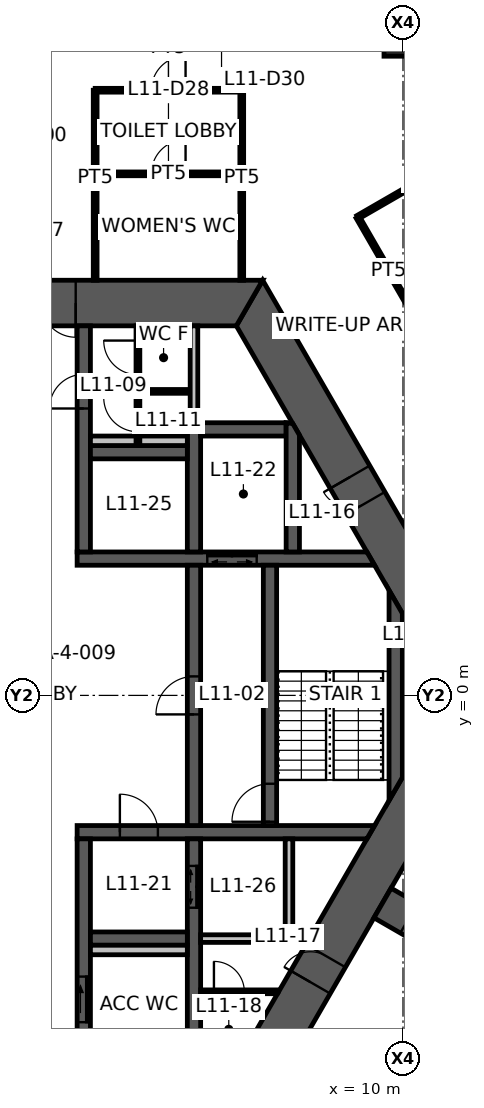
"""IFC4 building model, lengths in metres.
Left out: names, types, materials, properties, quantities, classifications, styles, units other than length and angle.
Written with IfcOpenShell. Run it as: python <this file> out.ifc"""

import sys

from ifc_helpers import new_model, si_unit, direction, frame, frame_2d, origin, origin_2d, place, context, subcontext, project, spatial, polyline, rectangle, hollow_rectangle, outline, extrude, element, fill, save


model = new_model("IFC4")
c1 = context("Model", 3, precision=1e-05, world=origin(), true_north=direction((0.0, 1.0)))
c2 = subcontext(c1, "Body", "Model", "MODEL_VIEW")
j1 = project(units=[si_unit("LENGTHUNIT", "METRE"), si_unit("PLANEANGLEUNIT", "RADIAN")], contexts=[c1])
p1 = place(None, origin())
s1 = spatial("IfcSite", under=j1, at=p1, CompositionType="ELEMENT")
p2 = place(p1, origin())
s2 = spatial("IfcBuilding", under=s1, at=p2, CompositionType="ELEMENT")
p3 = place(p2, frame((0.0, 0.0, 43.6)))
s3 = spatial("IfcBuildingStorey", under=s2, at=p3, CompositionType="ELEMENT", Elevation=43.6)
p4 = place(p3, frame((10.0, 17.321, 0.0), z_axis=(0.0, 0.0, 1.0), x_axis=(1.0, 0.0, 0.0)))
e1 = element("IfcColumn", 1, at=p4, inside=s3, PredefinedType="COLUMN", context=c2, shape_type="SweptSolid", body=[
    extrude(hollow_rectangle(XDim=1.0, YDim=1.0, WallThickness=0.06, at=origin_2d()), origin(), (0.0, 0.0, 1.0), 4.2),
])
p5 = place(p3, frame((11.922, 0.0, 0.0), z_axis=(0.0, 0.0, 1.0), x_axis=(-0.500004296715, 0.866022923061, 0.0)))
e2 = element("IfcWall", 2, at=p5, inside=s3, PredefinedType="SHEAR", context=c2, shape_type="SweptSolid", body=[
    extrude(outline(polyline([(-0.346, -0.6), (5.835, -0.6), (6.635, -0.6), (12.269, -0.6), (11.576, 0.6), (6.635, 0.6), (5.835, 0.6), (0.346, 0.6), (-0.346, -0.6)])), origin(), (0.0, 0.0, 1.0), 4.2),
])
p6 = place(p5, frame((5.835, 0.0, 0.0)))
e3 = element("IfcOpeningElement", 3, at=p6, cuts=e2, PredefinedType="OPENING", context=c2, shape_type="SweptSolid", body=[
    extrude(rectangle(XDim=0.8, YDim=2.1, at=frame_2d((0.4, 1.05))), frame((0.0, 0.61, 0.0), z_axis=(0.0, -1.0, 0.0), x_axis=(1.0, 0.0, 0.0)), (0.0, 0.0, 1.0), 1.22),
])
p7 = place(p3, frame((5.961, 10.325, 0.0), z_axis=(0.0, 0.0, 1.0), x_axis=(-1.0, 0.0, 0.0)))
e4 = element("IfcWall", 4, at=p7, inside=s3, PredefinedType="SHEAR", context=c2, shape_type="SweptSolid", body=[
    extrude(outline(polyline([(-0.346, -0.6), (4.574, -0.6), (5.474, -0.6), (6.449, -0.6), (7.349, -0.6), (12.269, -0.6), (11.576, 0.6), (7.349, 0.6), (6.449, 0.6), (5.474, 0.6), (4.574, 0.6), (0.346, 0.6), (-0.346, -0.6)])), origin(), (0.0, 0.0, 1.0), 4.2),
])
p8 = place(p7, frame((6.449, 0.0, 0.0)))
e5 = element("IfcOpeningElement", 5, at=p8, cuts=e4, PredefinedType="OPENING", context=c2, shape_type="SweptSolid", body=[
    extrude(rectangle(XDim=0.9, YDim=2.1, at=frame_2d((0.45, 1.05))), frame((0.0, 0.61, 0.0), z_axis=(0.0, -1.0, 0.0), x_axis=(1.0, 0.0, 0.0)), (0.0, 0.0, 1.0), 1.22),
])
p9 = place(p7, frame((4.574, 0.0, 0.0)))
e6 = element("IfcOpeningElement", 6, at=p9, cuts=e4, PredefinedType="OPENING", context=c2, shape_type="SweptSolid", body=[
    extrude(rectangle(XDim=0.9, YDim=2.1, at=frame_2d((0.45, 1.05))), frame((0.0, 0.61, 0.0), z_axis=(0.0, -1.0, 0.0), x_axis=(1.0, 0.0, 0.0)), (0.0, 0.0, 1.0), 1.22),
])
p10 = place(p3, frame((5.961, -10.325, 0.0), z_axis=(0.0, 0.0, 1.0), x_axis=(0.500004296715, 0.866022923061, 0.0)))
e7 = element("IfcWall", 7, at=p10, inside=s3, PredefinedType="SHEAR", context=c2, shape_type="SweptSolid", body=[
    extrude(outline(polyline([(-0.346, -0.6), (3.208, -0.6), (4.009, -0.6), (12.269, -0.6), (11.576, 0.6), (4.009, 0.6), (3.208, 0.6), (0.346, 0.6), (-0.346, -0.6)])), origin(), (0.0, 0.0, 1.0), 4.2),
])
p11 = place(p10, frame((3.208, 0.0, 0.0)))
e8 = element("IfcOpeningElement", 8, at=p11, cuts=e7, PredefinedType="OPENING", context=c2, shape_type="SweptSolid", body=[
    extrude(rectangle(XDim=0.8, YDim=2.1, at=frame_2d((0.4, 1.05))), frame((0.0, 0.61, 0.0), z_axis=(0.0, -1.0, 0.0), x_axis=(1.0, 0.0, 0.0)), (0.0, 0.0, 1.0), 1.22),
])
p12 = place(p3, frame((9.461, -5.462, 0.0), z_axis=(0.0, 0.0, 1.0), x_axis=(0.866019116917, -0.500010889016, 0.0)))
e9 = element("IfcWall", 9, at=p12, inside=s3, PredefinedType="SHEAR", context=c2, shape_type="SweptSolid", body=[
    extrude(rectangle(XDim=7.595, YDim=0.9, at=frame_2d((3.798, 0.0))), origin(), (0.0, 0.0, 1.0), 4.2),
])
p13 = place(p12, frame((0.8, 0.0, 0.0)))
e10 = element("IfcOpeningElement", 10, at=p13, cuts=e9, PredefinedType="OPENING", context=c2, shape_type="SweptSolid", body=[
    extrude(rectangle(XDim=1.0, YDim=2.1, at=frame_2d((0.5, 1.05))), frame((0.0, 0.46, 0.0), z_axis=(0.0, -1.0, 0.0), x_axis=(1.0, 0.0, 0.0)), (0.0, 0.0, 1.0), 0.92),
])
p14 = place(p3, frame((1.425, 3.6, 0.0), z_axis=(0.0, 0.0, 1.0), x_axis=(1.0, 0.0, 0.0)))
e11 = element("IfcWall", 11, at=p14, inside=s3, PredefinedType="SHEAR", context=c2, shape_type="SweptSolid", body=[
    extrude(outline(polyline([(0.0, -0.175), (3.425, -0.175), (4.725, -0.175), (7.827, -0.175), (7.625, 0.175), (4.725, 0.175), (3.425, 0.175), (0.0, 0.175), (0.0, -0.175)])), origin(), (0.0, 0.0, 1.0), 4.2),
])
p15 = place(p14, frame((3.425, 0.0, 0.0)))
e12 = element("IfcOpeningElement", 12, at=p15, cuts=e11, PredefinedType="OPENING", context=c2, shape_type="SweptSolid", body=[
    extrude(rectangle(XDim=1.3, YDim=2.1, at=frame_2d((0.65, 1.05))), frame((0.0, 0.185, 0.0), z_axis=(0.0, -1.0, 0.0), x_axis=(1.0, 0.0, 0.0)), (0.0, 0.0, 1.0), 0.37),
])
p16 = place(p3, frame((1.425, -3.6, 0.0), z_axis=(0.0, 0.0, 1.0), x_axis=(1.0, 0.0, 0.0)))
e13 = element("IfcWall", 13, at=p16, inside=s3, PredefinedType="SHEAR", context=c2, shape_type="SweptSolid", body=[
    extrude(outline(polyline([(0.0, -0.175), (1.125, -0.175), (2.125, -0.175), (7.625, -0.175), (7.827, 0.175), (2.125, 0.175), (1.125, 0.175), (0.0, 0.175), (0.0, -0.175)])), origin(), (0.0, 0.0, 1.0), 4.2),
])
p17 = place(p16, frame((1.125, 0.0, 0.0)))
e14 = element("IfcOpeningElement", 14, at=p17, cuts=e13, PredefinedType="OPENING", context=c2, shape_type="SweptSolid", body=[
    extrude(rectangle(XDim=1.0, YDim=2.1, at=frame_2d((0.5, 1.05))), frame((0.0, 0.185, 0.0), z_axis=(0.0, -1.0, 0.0), x_axis=(1.0, 0.0, 0.0)), (0.0, 0.0, 1.0), 0.37),
])
p18 = place(p3, frame((1.6, 3.775, 0.0), z_axis=(0.0, 0.0, 1.0), x_axis=(0.0, 1.0, 0.0)))
e15 = element("IfcWall", 15, at=p18, inside=s3, PredefinedType="SHEAR", context=c2, shape_type="SweptSolid", body=[
    extrude(rectangle(XDim=5.95, YDim=0.35, at=frame_2d((2.975, 0.0))), origin(), (0.0, 0.0, 1.0), 4.2),
])
p19 = place(p18, frame((3.775, 0.0, 0.0)))
e16 = element("IfcOpeningElement", 16, at=p19, cuts=e15, PredefinedType="OPENING", context=c2, shape_type="SweptSolid", body=[
    extrude(rectangle(XDim=0.9, YDim=2.1, at=frame_2d((0.45, 1.05))), frame((0.0, 0.185, 0.0), z_axis=(0.0, -1.0, 0.0), x_axis=(1.0, 0.0, 0.0)), (0.0, 0.0, 1.0), 0.37),
])
p20 = place(p3, frame((1.6, -3.775, 0.0), z_axis=(0.0, 0.0, 1.0), x_axis=(0.0, -1.0, 0.0)))
e17 = element("IfcWall", 17, at=p20, inside=s3, PredefinedType="SHEAR", context=c2, shape_type="SweptSolid", body=[
    extrude(rectangle(XDim=5.95, YDim=0.35, at=frame_2d((2.975, 0.0))), origin(), (0.0, 0.0, 1.0), 4.2),
])
p21 = place(p20, frame((3.625, 0.0, 0.0)))
e18 = element("IfcOpeningElement", 18, at=p21, cuts=e17, PredefinedType="OPENING", context=c2, shape_type="SweptSolid", body=[
    extrude(rectangle(XDim=1.2, YDim=2.1, at=frame_2d((0.6, 1.05))), frame((0.0, 0.185, 0.0), z_axis=(0.0, -1.0, 0.0), x_axis=(1.0, 0.0, 0.0)), (0.0, 0.0, 1.0), 0.37),
])
p22 = place(p3, frame((4.5, -3.425, 0.0), z_axis=(0.0, 0.0, 1.0), x_axis=(0.0, 1.0, 0.0)))
e19 = element("IfcWall", 19, at=p22, inside=s3, PredefinedType="SHEAR", context=c2, shape_type="SweptSolid", body=[
    extrude(rectangle(XDim=6.85, YDim=0.35, at=frame_2d((3.425, 0.0))), origin(), (0.0, 0.0, 1.0), 4.2),
])
p23 = place(p22, frame((2.925, 0.0, 0.0)))
e20 = element("IfcOpeningElement", 20, at=p23, cuts=e19, PredefinedType="OPENING", context=c2, shape_type="SweptSolid", body=[
    extrude(rectangle(XDim=1.0, YDim=2.1, at=frame_2d((0.5, 1.05))), frame((0.0, 0.185, 0.0), z_axis=(0.0, -1.0, 0.0), x_axis=(1.0, 0.0, 0.0)), (0.0, 0.0, 1.0), 0.37),
])
p24 = place(p3, frame((6.5, -3.425, 0.0), z_axis=(0.0, 0.0, 1.0), x_axis=(0.0, 1.0, 0.0)))
e21 = element("IfcWall", 21, at=p24, inside=s3, PredefinedType="SHEAR", context=c2, shape_type="SweptSolid", body=[
    extrude(rectangle(XDim=6.85, YDim=0.35, at=frame_2d((3.425, 0.0))), origin(), (0.0, 0.0, 1.0), 4.2),
])
p25 = place(p24, frame((0.1, 0.0, 0.0)))
e22 = element("IfcOpeningElement", 22, at=p25, cuts=e21, PredefinedType="OPENING", context=c2, shape_type="SweptSolid", body=[
    extrude(rectangle(XDim=1.0, YDim=2.1, at=frame_2d((0.5, 1.05))), frame((0.0, 0.185, 0.0), z_axis=(0.0, -1.0, 0.0), x_axis=(1.0, 0.0, 0.0)), (0.0, 0.0, 1.0), 0.37),
])
p26 = place(p3, frame((4.5, 3.775, 0.0), z_axis=(0.0, 0.0, 1.0), x_axis=(0.0, 1.0, 0.0)))
e23 = element("IfcWall", 23, at=p26, inside=s3, PredefinedType="SHEAR", context=c2, shape_type="SweptSolid", body=[
    extrude(rectangle(XDim=3.4, YDim=0.35, at=frame_2d((1.7, 0.0))), origin(), (0.0, 0.0, 1.0), 4.2),
])
p27 = place(p3, frame((4.5, -3.775, 0.0), z_axis=(0.0, 0.0, 1.0), x_axis=(0.0, -1.0, 0.0)))
e24 = element("IfcWall", 24, at=p27, inside=s3, PredefinedType="SHEAR", context=c2, shape_type="SweptSolid", body=[
    extrude(rectangle(XDim=5.95, YDim=0.35, at=frame_2d((2.975, 0.0))), origin(), (0.0, 0.0, 1.0), 4.2),
])
p28 = place(p27, frame((0.712, 0.0, 0.0)))
e25 = element("IfcOpeningElement", 25, at=p28, cuts=e24, PredefinedType="OPENING", context=c2, shape_type="SweptSolid", body=[
    extrude(rectangle(XDim=1.1, YDim=2.1, at=frame_2d((0.55, 1.05))), frame((0.0, 0.185, 0.0), z_axis=(0.0, -1.0, 0.0), x_axis=(1.0, 0.0, 0.0)), (0.0, 0.0, 1.0), 0.37),
])
for number, where, z_axis, x_axis in (
    (26, (1.775, 6.4, 0.0), (0.0, 0.0, 1.0), (1.0, 0.0, 0.0)),
    (27, (1.775, -6.4, 0.0), (0.0, 0.0, 1.0), (1.0, 0.0, 0.0)),
):
    element("IfcWall", number, at=place(p3, frame(where, z_axis=z_axis, x_axis=x_axis)), inside=s3, PredefinedType="SHEAR", context=c2, shape_type="SweptSolid", body=[
        extrude(rectangle(XDim=2.55, YDim=0.35, at=frame_2d((1.275, 0.0))), origin(), (0.0, 0.0, 1.0), 4.2),
    ])
p29 = place(p3, frame((4.675, 7.0, 0.0), z_axis=(0.0, 0.0, 1.0), x_axis=(1.0, 0.0, 0.0)))
e28 = element("IfcWall", 28, at=p29, inside=s3, PredefinedType="SHEAR", context=c2, shape_type="SweptSolid", body=[
    extrude(rectangle(XDim=2.25, YDim=0.35, at=frame_2d((1.125, 0.0))), origin(), (0.0, 0.0, 1.0), 4.2),
])
p30 = place(p3, frame((7.1, 3.775, 0.0), z_axis=(0.0, 0.0, 1.0), x_axis=(0.0, 1.0, 0.0)))
e29 = element("IfcWall", 29, at=p30, inside=s3, PredefinedType="SHEAR", context=c2, shape_type="SweptSolid", body=[
    extrude(outline(polyline([(0.0, -0.175), (3.074, -0.175), (3.377, 0.0), (3.4, 0.175), (0.0, 0.175), (0.0, -0.175)])), origin(), (0.0, 0.0, 1.0), 4.2),
])
p31 = place(p3, frame((9.808, -2.462, 0.0), z_axis=(0.0, 0.0, 1.0), x_axis=(0.0, 1.0, 0.0)))
e30 = element("IfcWall", 30, at=p31, inside=s3, PredefinedType="SHEAR", context=c2, shape_type="SweptSolid", body=[
    extrude(outline(polyline([(0.303, -0.175), (4.621, -0.175), (5.228, 0.175), (-0.303, 0.175), (0.303, -0.175)])), origin(), (0.0, 0.0, 1.0), 4.2),
])
p32 = place(p3, frame((4.5, 7.175, 0.0), z_axis=(0.0, 0.0, 1.0), x_axis=(0.0, 1.0, 0.0)))
e31 = element("IfcWall", 31, at=p32, inside=s3, PredefinedType="STANDARD", context=c2, shape_type="SweptSolid", body=[
    extrude(rectangle(XDim=2.55, YDim=0.2, at=frame_2d((1.275, 0.0))), origin(), (0.0, 0.0, 1.0), 4.2),
])
p33 = place(p3, frame((4.675, -6.4, 0.0), z_axis=(0.0, 0.0, 1.0), x_axis=(1.0, 0.0, 0.0)))
e32 = element("IfcWall", 32, at=p33, inside=s3, PredefinedType="STANDARD", context=c2, shape_type="SweptSolid", body=[
    extrude(rectangle(XDim=2.425, YDim=0.2, at=frame_2d((1.212, 0.0))), origin(), (0.0, 0.0, 1.0), 4.2),
])
p34 = place(p3, frame((7.0, -3.775, 0.0), z_axis=(0.0, 0.0, 1.0), x_axis=(0.0, -1.0, 0.0)))
e33 = element("IfcWall", 33, at=p34, inside=s3, PredefinedType="STANDARD", context=c2, shape_type="SweptSolid", body=[
    extrude(rectangle(XDim=2.525, YDim=0.2, at=frame_2d((1.263, 0.0))), origin(), (0.0, 0.0, 1.0), 4.2),
])
for number, where, z_axis, x_axis in (
    (34, (1.775, 6.7, 0.0), (0.0, 0.0, 1.0), (1.0, 0.0, 0.0)),
    (35, (1.775, -6.7, 0.0), (0.0, 0.0, 1.0), (1.0, 0.0, 0.0)),
):
    element("IfcWall", number, at=place(p3, frame(where, z_axis=z_axis, x_axis=x_axis)), inside=s3, PredefinedType="PLUMBINGWALL", context=c2, shape_type="SweptSolid", body=[
        extrude(rectangle(XDim=2.55, YDim=0.25, at=frame_2d((1.275, 0.0))), origin(), (0.0, 0.0, 1.0), 4.2),
    ])
p35 = place(p3, frame((3.025, 6.575, 0.0), z_axis=(0.0, 0.0, 1.0), x_axis=(0.0, 1.0, 0.0)))
e36 = element("IfcWall", 36, at=p35, inside=s3, PredefinedType="PARTITIONING", context=c2, shape_type="SweptSolid", body=[
    extrude(rectangle(XDim=3.15, YDim=0.1, at=frame_2d((1.575, 0.0))), origin(), (0.0, 0.0, 1.0), 3.23),
])
p36 = place(p35, frame((1.863, 0.0, 0.0)))
e37 = element("IfcOpeningElement", 37, at=p36, cuts=e36, PredefinedType="OPENING", context=c2, shape_type="SweptSolid", body=[
    extrude(rectangle(XDim=0.9, YDim=2.1, at=frame_2d((0.45, 1.05))), frame((0.0, 0.06, 0.0), z_axis=(0.0, -1.0, 0.0), x_axis=(1.0, 0.0, 0.0)), (0.0, 0.0, 1.0), 0.12),
])
p37 = place(p35, frame((0.363, 0.0, 0.0)))
e38 = element("IfcOpeningElement", 38, at=p37, cuts=e36, PredefinedType="OPENING", context=c2, shape_type="SweptSolid", body=[
    extrude(rectangle(XDim=0.9, YDim=2.1, at=frame_2d((0.45, 1.05))), frame((0.0, 0.06, 0.0), z_axis=(0.0, -1.0, 0.0), x_axis=(1.0, 0.0, 0.0)), (0.0, 0.0, 1.0), 0.12),
])
p38 = place(p3, frame((3.075, 8.0, 0.0), z_axis=(0.0, 0.0, 1.0), x_axis=(1.0, 0.0, 0.0)))
e39 = element("IfcWall", 39, at=p38, inside=s3, PredefinedType="PARTITIONING", context=c2, shape_type="SweptSolid", body=[
    extrude(rectangle(XDim=1.25, YDim=0.1, at=frame_2d((0.625, 0.0))), origin(), (0.0, 0.0, 1.0), 3.23),
])
p39 = place(p3, frame((4.675, -7.8, 0.0), z_axis=(0.0, 0.0, 1.0), x_axis=(1.0, 0.0, 0.0)))
e40 = element("IfcWall", 40, at=p39, inside=s3, PredefinedType="PARTITIONING", context=c2, shape_type="SweptSolid", body=[
    extrude(outline(polyline([(0.0, -0.05), (0.35, -0.05), (1.15, -0.05), (2.022, -0.05), (2.051, 0.0), (2.057, 0.05), (1.15, 0.05), (0.35, 0.05), (0.0, 0.05), (0.0, -0.05)])), origin(), (0.0, 0.0, 1.0), 3.23),
])
p40 = place(p39, frame((0.35, 0.0, 0.0)))
e41 = element("IfcOpeningElement", 41, at=p40, cuts=e40, PredefinedType="OPENING", context=c2, shape_type="SweptSolid", body=[
    extrude(rectangle(XDim=0.8, YDim=2.1, at=frame_2d((0.4, 1.05))), frame((0.0, 0.06, 0.0), z_axis=(0.0, -1.0, 0.0), x_axis=(1.0, 0.0, 0.0)), (0.0, 0.0, 1.0), 0.12),
])
p41 = place(p3, frame((1.9, 13.725, 0.0), z_axis=(0.0, 0.0, 1.0), x_axis=(1.0, 0.0, 0.0)))
e42 = element("IfcWall", 42, at=p41, inside=s3, PredefinedType="PARTITIONING", context=c2, shape_type="SweptSolid", body=[
    extrude(rectangle(XDim=3.857, YDim=0.1, at=frame_2d((1.929, 0.0))), origin(), (0.0, 0.0, 1.0), 3.23),
])
p42 = place(p41, frame((1.479, 0.0, 0.0)))
e43 = element("IfcOpeningElement", 43, at=p42, cuts=e42, PredefinedType="OPENING", context=c2, shape_type="SweptSolid", body=[
    extrude(rectangle(XDim=0.9, YDim=2.1, at=frame_2d((0.45, 1.05))), frame((0.0, 0.06, 0.0), z_axis=(0.0, -1.0, 0.0), x_axis=(1.0, 0.0, 0.0)), (0.0, 0.0, 1.0), 0.12),
])
p43 = place(p3, frame((1.9, 15.925, 0.0), z_axis=(0.0, 0.0, 1.0), x_axis=(1.0, 0.0, 0.0)))
e44 = element("IfcWall", 44, at=p43, inside=s3, PredefinedType="PARTITIONING", context=c2, shape_type="SweptSolid", body=[
    extrude(rectangle(XDim=3.857, YDim=0.1, at=frame_2d((1.929, 0.0))), origin(), (0.0, 0.0, 1.0), 3.23),
])
p44 = place(p43, frame((1.479, 0.0, 0.0)))
e45 = element("IfcOpeningElement", 45, at=p44, cuts=e44, PredefinedType="OPENING", context=c2, shape_type="SweptSolid", body=[
    extrude(rectangle(XDim=0.9, YDim=2.1, at=frame_2d((0.45, 1.05))), frame((0.0, 0.06, 0.0), z_axis=(0.0, -1.0, 0.0), x_axis=(1.0, 0.0, 0.0)), (0.0, 0.0, 1.0), 0.12),
])
for number, where, z_axis, x_axis in (
    (46, (1.9, 10.925, 0.0), (0.0, 0.0, 1.0), (0.0, 1.0, 0.0)),
    (47, (5.757, 10.925, 0.0), (0.0, 0.0, 1.0), (0.0, 1.0, 0.0)),
):
    element("IfcWall", number, at=place(p3, frame(where, z_axis=z_axis, x_axis=x_axis)), inside=s3, PredefinedType="PARTITIONING", context=c2, shape_type="SweptSolid", body=[
        extrude(rectangle(XDim=5.0, YDim=0.1, at=frame_2d((2.5, 0.0))), origin(), (0.0, 0.0, 1.0), 3.23),
    ])
p45 = place(p3, frame((8.809, 12.583, 0.0), z_axis=(0.0, 0.0, 1.0), x_axis=(0.866027358884, 0.499996613652, 0.0)))
e48 = element("IfcWall", 48, at=p45, inside=s3, PredefinedType="PARTITIONING", context=c2, shape_type="SweptSolid", body=[
    extrude(rectangle(XDim=3.88, YDim=0.1, at=frame_2d((1.94, 0.0))), origin(), (0.0, 0.0, 1.0), 3.23),
])
p46 = place(p3, frame((10.432, 9.772, 0.0), z_axis=(0.0, 0.0, 1.0), x_axis=(-0.500013214685, 0.866017774148, 0.0)))
e49 = element("IfcWall", 49, at=p46, inside=s3, PredefinedType="PARTITIONING", context=c2, shape_type="SweptSolid", body=[
    extrude(rectangle(XDim=3.247, YDim=0.1, at=frame_2d((1.623, 0.0))), origin(), (0.0, 0.0, 1.0), 3.23),
])
p47 = place(p9, origin())
e50 = element("IfcDoor", 50, at=p47, inside=s3, OperationType="SINGLE_SWING_LEFT", PredefinedType="DOOR", context=c2, shape_type="SweptSolid", body=[
    extrude(rectangle(XDim=0.9, YDim=2.1, at=frame_2d((0.45, 1.05))), frame((0.0, 0.025, 0.0), z_axis=(0.0, -1.0, 0.0), x_axis=(1.0, 0.0, 0.0)), (0.0, 0.0, 1.0), 0.05),
])
fill(e6, e50)
p48 = place(p6, origin())
e51 = element("IfcDoor", 51, at=p48, inside=s3, OperationType="SINGLE_SWING_RIGHT", PredefinedType="DOOR", context=c2, shape_type="SweptSolid", body=[
    extrude(rectangle(XDim=0.8, YDim=2.1, at=frame_2d((0.4, 1.05))), frame((0.0, 0.025, 0.0), z_axis=(0.0, -1.0, 0.0), x_axis=(1.0, 0.0, 0.0)), (0.0, 0.0, 1.0), 0.05),
])
fill(e3, e51)
p49 = place(p11, origin())
e52 = element("IfcDoor", 52, at=p49, inside=s3, OperationType="SINGLE_SWING_LEFT", PredefinedType="DOOR", context=c2, shape_type="SweptSolid", body=[
    extrude(rectangle(XDim=0.8, YDim=2.1, at=frame_2d((0.4, 1.05))), frame((0.0, 0.025, 0.0), z_axis=(0.0, -1.0, 0.0), x_axis=(1.0, 0.0, 0.0)), (0.0, 0.0, 1.0), 0.05),
])
fill(e8, e52)
p50 = place(p23, origin())
e53 = element("IfcDoor", 53, at=p50, inside=s3, OperationType="SINGLE_SWING_LEFT", PredefinedType="DOOR", context=c2, shape_type="SweptSolid", body=[
    extrude(rectangle(XDim=1.0, YDim=2.1, at=frame_2d((0.5, 1.05))), frame((0.0, 0.025, 0.0), z_axis=(0.0, -1.0, 0.0), x_axis=(1.0, 0.0, 0.0)), (0.0, 0.0, 1.0), 0.05),
])
fill(e20, e53)
p51 = place(p25, origin())
e54 = element("IfcDoor", 54, at=p51, inside=s3, OperationType="SINGLE_SWING_LEFT", PredefinedType="DOOR", context=c2, shape_type="SweptSolid", body=[
    extrude(rectangle(XDim=1.0, YDim=2.1, at=frame_2d((0.5, 1.05))), frame((0.0, 0.025, 0.0), z_axis=(0.0, -1.0, 0.0), x_axis=(1.0, 0.0, 0.0)), (0.0, 0.0, 1.0), 0.05),
])
fill(e22, e54)
p52 = place(p19, origin())
e55 = element("IfcDoor", 55, at=p52, inside=s3, OperationType="SINGLE_SWING_LEFT", PredefinedType="DOOR", context=c2, shape_type="SweptSolid", body=[
    extrude(rectangle(XDim=0.9, YDim=2.1, at=frame_2d((0.45, 1.05))), frame((0.0, 0.025, 0.0), z_axis=(0.0, -1.0, 0.0), x_axis=(1.0, 0.0, 0.0)), (0.0, 0.0, 1.0), 0.05),
])
fill(e16, e55)
p53 = place(p21, origin())
e56 = element("IfcDoor", 56, at=p53, inside=s3, OperationType="SLIDING_TO_LEFT", PredefinedType="DOOR", context=c2, shape_type="SweptSolid", body=[
    extrude(rectangle(XDim=1.2, YDim=2.1, at=frame_2d((0.6, 1.05))), frame((0.0, 0.025, 0.0), z_axis=(0.0, -1.0, 0.0), x_axis=(1.0, 0.0, 0.0)), (0.0, 0.0, 1.0), 0.05),
])
fill(e18, e56)
p54 = place(p17, origin())
e57 = element("IfcDoor", 57, at=p54, inside=s3, OperationType="SINGLE_SWING_LEFT", PredefinedType="DOOR", context=c2, shape_type="SweptSolid", body=[
    extrude(rectangle(XDim=1.0, YDim=2.1, at=frame_2d((0.5, 1.05))), frame((0.0, 0.025, 0.0), z_axis=(0.0, -1.0, 0.0), x_axis=(1.0, 0.0, 0.0)), (0.0, 0.0, 1.0), 0.05),
])
fill(e14, e57)
p55 = place(p36, origin())
e58 = element("IfcDoor", 58, at=p55, inside=s3, OperationType="SINGLE_SWING_RIGHT", PredefinedType="DOOR", context=c2, shape_type="SweptSolid", body=[
    extrude(rectangle(XDim=0.9, YDim=2.1, at=frame_2d((0.45, 1.05))), frame((0.0, 0.025, 0.0), z_axis=(0.0, -1.0, 0.0), x_axis=(1.0, 0.0, 0.0)), (0.0, 0.0, 1.0), 0.05),
])
fill(e37, e58)
p56 = place(p37, origin())
e59 = element("IfcDoor", 59, at=p56, inside=s3, OperationType="SINGLE_SWING_RIGHT", PredefinedType="DOOR", context=c2, shape_type="SweptSolid", body=[
    extrude(rectangle(XDim=0.9, YDim=2.1, at=frame_2d((0.45, 1.05))), frame((0.0, 0.025, 0.0), z_axis=(0.0, -1.0, 0.0), x_axis=(1.0, 0.0, 0.0)), (0.0, 0.0, 1.0), 0.05),
])
fill(e38, e59)
p57 = place(p40, origin())
e60 = element("IfcDoor", 60, at=p57, inside=s3, OperationType="SINGLE_SWING_LEFT", PredefinedType="DOOR", context=c2, shape_type="SweptSolid", body=[
    extrude(rectangle(XDim=0.8, YDim=2.1, at=frame_2d((0.4, 1.05))), frame((0.0, 0.025, 0.0), z_axis=(0.0, -1.0, 0.0), x_axis=(1.0, 0.0, 0.0)), (0.0, 0.0, 1.0), 0.05),
])
fill(e41, e60)
p58 = place(p42, origin())
e61 = element("IfcDoor", 61, at=p58, inside=s3, OperationType="SINGLE_SWING_RIGHT", PredefinedType="DOOR", context=c2, shape_type="SweptSolid", body=[
    extrude(rectangle(XDim=0.9, YDim=2.1, at=frame_2d((0.45, 1.05))), frame((0.0, 0.025, 0.0), z_axis=(0.0, -1.0, 0.0), x_axis=(1.0, 0.0, 0.0)), (0.0, 0.0, 1.0), 0.05),
])
fill(e43, e61)
p59 = place(p44, origin())
e62 = element("IfcDoor", 62, at=p59, inside=s3, OperationType="SINGLE_SWING_RIGHT", PredefinedType="DOOR", context=c2, shape_type="SweptSolid", body=[
    extrude(rectangle(XDim=0.9, YDim=2.1, at=frame_2d((0.45, 1.05))), frame((0.0, 0.025, 0.0), z_axis=(0.0, -1.0, 0.0), x_axis=(1.0, 0.0, 0.0)), (0.0, 0.0, 1.0), 0.05),
])
fill(e45, e62)
p60 = place(p28, origin())
e63 = element("IfcDoor", 63, at=p60, inside=s3, OperationType="DOUBLE_DOOR_SLIDING", PredefinedType="DOOR", context=c2, shape_type="SweptSolid", body=[
    extrude(rectangle(XDim=1.1, YDim=2.1, at=frame_2d((0.55, 1.05))), frame((0.0, 0.025, 0.0), z_axis=(0.0, -1.0, 0.0), x_axis=(1.0, 0.0, 0.0)), (0.0, 0.0, 1.0), 0.05),
])
fill(e25, e63)
p61 = place(p15, origin())
e64 = element("IfcDoor", 64, at=p61, inside=s3, OperationType="DOUBLE_DOOR_SLIDING", PredefinedType="DOOR", context=c2, shape_type="SweptSolid", body=[
    extrude(rectangle(XDim=1.3, YDim=2.1, at=frame_2d((0.65, 1.05))), frame((0.0, 0.025, 0.0), z_axis=(0.0, -1.0, 0.0), x_axis=(1.0, 0.0, 0.0)), (0.0, 0.0, 1.0), 0.05),
])
fill(e12, e64)
save(model, sys.argv[1])
